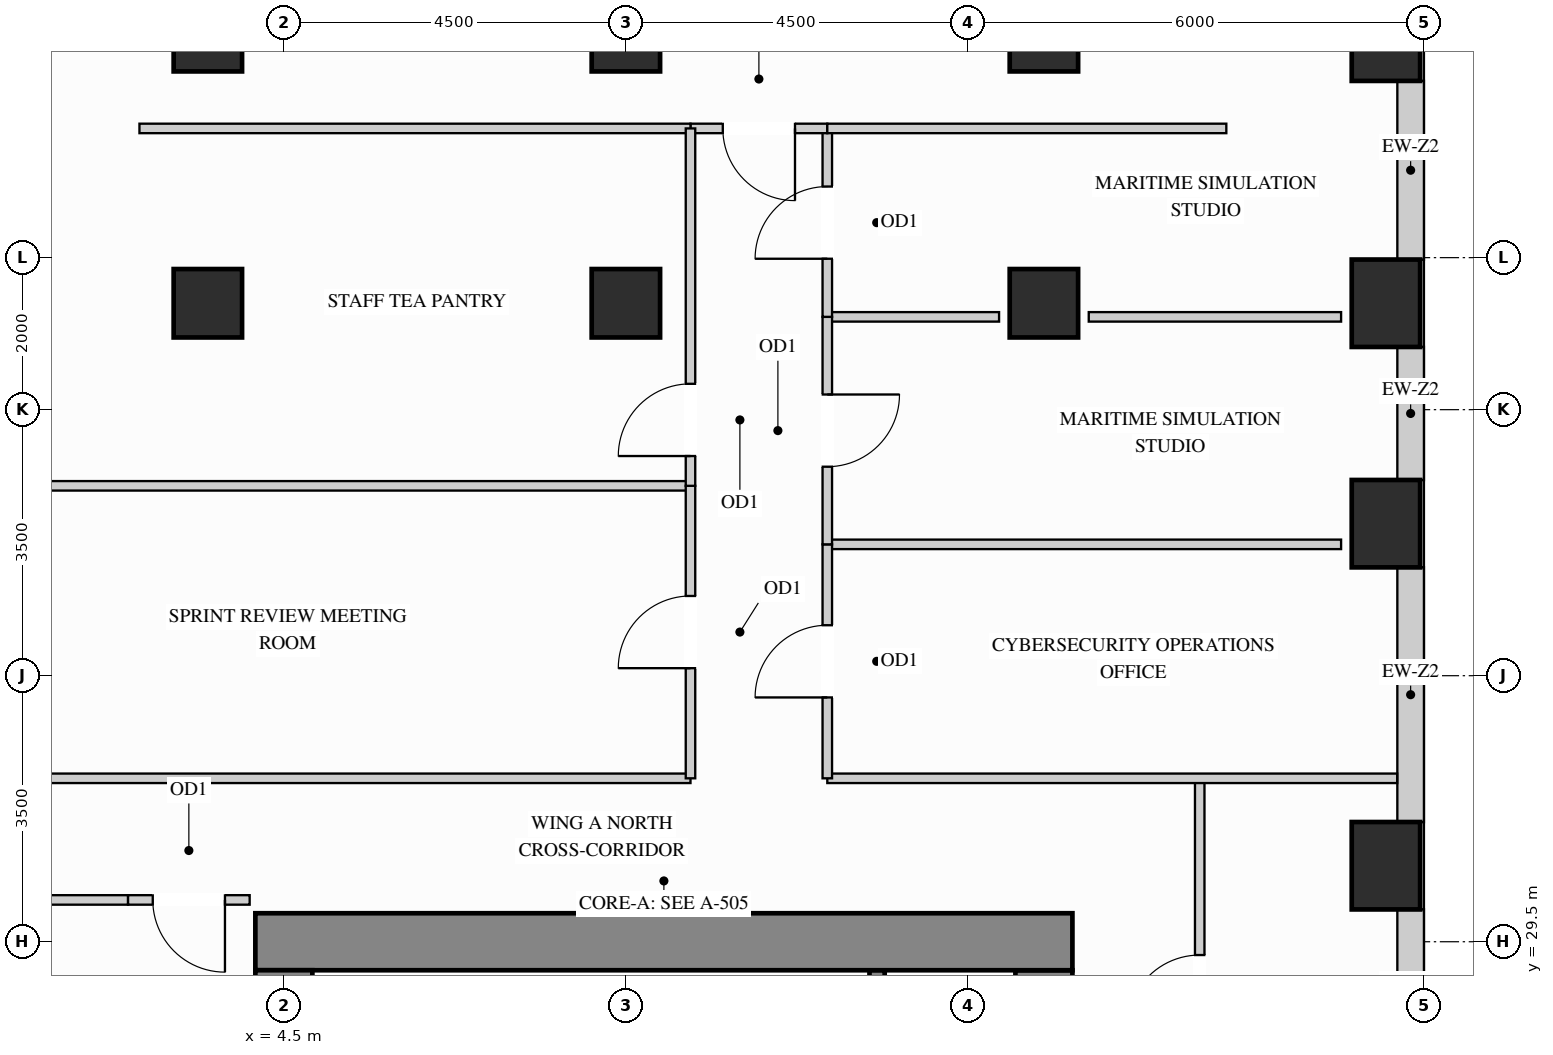
"""IFC4 building model, lengths in metres.
Left out: names, types, materials, properties, quantities, classifications, styles, units other than length and angle.
Written with IfcOpenShell. Run it as: python <this file> out.ifc"""

import sys

from ifc_helpers import new_model, si_unit, direction, frame, frame_2d, origin, origin_2d, place, context, subcontext, project, spatial, rectangle, extrude, source, transform, mapped, element, fill, save


model = new_model("IFC4")
c1 = context("Model", 3, precision=1e-05, world=origin(), true_north=direction((0.0, 1.0)))
c2 = subcontext(c1, "Body", "Model", "MODEL_VIEW")
j1 = project(units=[si_unit("LENGTHUNIT", "METRE"), si_unit("PLANEANGLEUNIT", "RADIAN")], contexts=[c1])
p1 = place(None, origin())
s1 = spatial("IfcSite", under=j1, at=p1, CompositionType="ELEMENT")
p2 = place(p1, origin())
s2 = spatial("IfcBuilding", under=s1, at=p2, CompositionType="ELEMENT")
p3 = place(p2, frame((0.0, 0.0, 102.6)))
s3 = spatial("IfcBuildingStorey", under=s2, at=p3, CompositionType="ELEMENT", Elevation=102.6)
m1 = source(origin(), c2, "Body", "SweptSolid", [
    extrude(rectangle(XDim=0.9, YDim=0.9, at=origin_2d()), origin(), (0.0, 0.0, 1.0), 3.38),
])
for number, where, z_axis, x_axis in (
    (1, (14.5, 37.9, 0.0), (0.0, 0.0, 1.0), (1.0, 0.0, 0.0)),
    (2, (14.5, 41.4, 0.0), (0.0, 0.0, 1.0), (1.0, 0.0, 0.0)),
    (3, (3.5, 37.9, 0.0), (0.0, 0.0, 1.0), (1.0, 0.0, 0.0)),
    (4, (3.5, 41.4, 0.0), (0.0, 0.0, 1.0), (1.0, 0.0, 0.0)),
    (5, (9.0, 37.9, 0.0), (0.0, 0.0, 1.0), (1.0, 0.0, 0.0)),
    (6, (9.0, 41.4, 0.0), (0.0, 0.0, 1.0), (1.0, 0.0, 0.0)),
):
    element("IfcColumn", number, at=place(p3, frame(where, z_axis=z_axis, x_axis=x_axis)), inside=s3, PredefinedType="COLUMN", context=c2, shape_type="MappedRepresentation", body=[
        mapped(m1, transform((0.0, 0.0, 0.0), x_axis=(1.0, 0.0, 0.0), y_axis=(0.0, 1.0, 0.0), z_axis=(0.0, 0.0, 1.0))),
    ])
m2 = source(origin(), c2, "Body", "SweptSolid", [
    extrude(rectangle(XDim=0.9, YDim=1.15, at=origin_2d()), origin(), (0.0, 0.0, 1.0), 3.38),
])
for number, where, z_axis, x_axis in (
    (7, (19.0, 30.5, 0.0), (0.0, 0.0, 1.0), (1.0, 0.0, 0.0)),
    (8, (19.0, 35.0, 0.0), (0.0, 0.0, 1.0), (1.0, 0.0, 0.0)),
    (9, (19.0, 37.9, 0.0), (0.0, 0.0, 1.0), (1.0, 0.0, 0.0)),
    (10, (19.0, 41.4, 0.0), (0.0, 0.0, 1.0), (1.0, 0.0, 0.0)),
):
    element("IfcColumn", number, at=place(p3, frame(where, z_axis=z_axis, x_axis=x_axis)), inside=s3, PredefinedType="COLUMN", context=c2, shape_type="MappedRepresentation", body=[
        mapped(m2, transform((0.0, 0.0, 0.0), x_axis=(1.0, 0.0, 0.0), y_axis=(0.0, 1.0, 0.0), z_axis=(0.0, 0.0, 1.0))),
    ])
m3 = source(origin(), c2, "Body", "SweptSolid", [
    extrude(rectangle(XDim=8.245, YDim=0.75, at=frame_2d((4.123, 0.0))), origin(), (0.0, 0.0, 1.0), 3.38),
])
p4 = place(p3, frame((14.5, 20.88, 0.0), z_axis=(0.0, 0.0, 1.0), x_axis=(0.0, 1.0, 0.0)))
e11 = element("IfcWall", 11, at=p4, inside=s3, PredefinedType="SHEAR", context=c2, shape_type="MappedRepresentation", body=[
    mapped(m3, transform((0.0, 0.0, 0.0), x_axis=(1.0, 0.0, 0.0), y_axis=(0.0, 1.0, 0.0), z_axis=(0.0, 0.0, 1.0))),
])
m4 = source(origin(), c2, "Body", "SweptSolid", [
    extrude(rectangle(XDim=10.75, YDim=0.75, at=frame_2d((5.375, 0.0))), origin(), (0.0, 0.0, 1.0), 3.38),
])
p5 = place(p3, frame((4.125, 29.5, 0.0), z_axis=(0.0, 0.0, 1.0), x_axis=(1.0, 0.0, 0.0)))
e12 = element("IfcWall", 12, at=p5, inside=s3, PredefinedType="SHEAR", context=c2, shape_type="MappedRepresentation", body=[
    mapped(m4, transform((0.0, 0.0, 0.0), x_axis=(1.0, 0.0, 0.0), y_axis=(0.0, 1.0, 0.0), z_axis=(0.0, 0.0, 1.0))),
])
m5 = source(origin(), c2, "Body", "SweptSolid", [
    extrude(rectangle(XDim=20.25, YDim=0.75, at=frame_2d((10.125, 0.0))), origin(), (0.0, 0.0, 1.0), 3.38),
])
p6 = place(p3, frame((4.5, 8.875, 0.0), z_axis=(0.0, 0.0, 1.0), x_axis=(0.0, 1.0, 0.0)))
e13 = element("IfcWall", 13, at=p6, inside=s3, PredefinedType="SHEAR", context=c2, shape_type="MappedRepresentation", body=[
    mapped(m5, transform((0.0, 0.0, 0.0), x_axis=(1.0, 0.0, 0.0), y_axis=(0.0, 1.0, 0.0), z_axis=(0.0, 0.0, 1.0))),
])
p7 = place(p3, frame((19.325, 27.373, 0.0), z_axis=(0.0, 0.0, 1.0), x_axis=(0.0, 1.0, 0.0)))
e14 = element("IfcWall", 14, at=p7, inside=s3, PredefinedType="SOLIDWALL", context=c2, shape_type="SweptSolid", body=[
    extrude(rectangle(XDim=2.554, YDim=0.35, at=frame_2d((1.277, 0.0))), origin(), (0.0, 0.0, 1.0), 2.519),
])
p8 = place(p7, frame((0.48, 0.0, 0.78)))
e15 = element("IfcOpeningElement", 15, at=p8, cuts=e14, PredefinedType="OPENING", context=c2, shape_type="SweptSolid", body=[
    extrude(rectangle(XDim=1.2, YDim=1.559, at=frame_2d((0.6, 0.78))), frame((0.0, 0.185, 0.0), z_axis=(0.0, -1.0, 0.0), x_axis=(1.0, 0.0, 0.0)), (0.0, 0.0, 1.0), 0.37),
])
m6 = source(origin(), c2, "Body", "SweptSolid", [
    extrude(rectangle(XDim=3.354, YDim=0.35, at=frame_2d((1.677, 0.0))), origin(), (0.0, 0.0, 1.0), 2.519),
])
p9 = place(p3, frame((19.325, 31.073, 0.0), z_axis=(0.0, 0.0, 1.0), x_axis=(0.0, 1.0, 0.0)))
e16 = element("IfcWall", 16, at=p9, inside=s3, PredefinedType="SOLIDWALL", context=c2, shape_type="MappedRepresentation", body=[
    mapped(m6, transform((0.0, 0.0, 0.0), x_axis=(1.0, 0.0, 0.0), y_axis=(0.0, 1.0, 0.0), z_axis=(0.0, 0.0, 1.0))),
])
m7 = source(origin(), c2, "Body", "SweptSolid", [
    extrude(rectangle(XDim=1.754, YDim=0.35, at=frame_2d((0.877, 0.0))), origin(), (0.0, 0.0, 1.0), 2.519),
])
p10 = place(p3, frame((19.325, 35.573, 0.0), z_axis=(0.0, 0.0, 1.0), x_axis=(0.0, 1.0, 0.0)))
e17 = element("IfcWall", 17, at=p10, inside=s3, PredefinedType="SOLIDWALL", context=c2, shape_type="MappedRepresentation", body=[
    mapped(m7, transform((0.0, 0.0, 0.0), x_axis=(1.0, 0.0, 0.0), y_axis=(0.0, 1.0, 0.0), z_axis=(0.0, 0.0, 1.0))),
])
m8 = source(origin(), c2, "Body", "SweptSolid", [
    extrude(rectangle(XDim=2.354, YDim=0.35, at=frame_2d((1.177, 0.0))), origin(), (0.0, 0.0, 1.0), 2.519),
])
p11 = place(p3, frame((19.325, 38.473, 0.0), z_axis=(0.0, 0.0, 1.0), x_axis=(0.0, 1.0, 0.0)))
e18 = element("IfcWall", 18, at=p11, inside=s3, PredefinedType="SOLIDWALL", context=c2, shape_type="MappedRepresentation", body=[
    mapped(m8, transform((0.0, 0.0, 0.0), x_axis=(1.0, 0.0, 0.0), y_axis=(0.0, 1.0, 0.0), z_axis=(0.0, 0.0, 1.0))),
])
p12 = place(p3, frame((16.55, 26.05, 0.0), z_axis=(0.0, 0.0, 1.0), x_axis=(0.0, 1.0, 0.0)))
e19 = element("IfcWall", 19, at=p12, inside=s3, PredefinedType="PARTITIONING", context=c2, shape_type="SweptSolid", body=[
    extrude(rectangle(XDim=5.6, YDim=0.125, at=frame_2d((2.8, 0.0))), origin(), (0.0, 0.0, 1.0), 3.365),
])
p13 = place(p12, frame((2.325, 0.0, 0.0)))
e20 = element("IfcOpeningElement", 20, at=p13, cuts=e19, PredefinedType="OPENING", context=c2, shape_type="SweptSolid", body=[
    extrude(rectangle(XDim=0.95, YDim=2.15, at=frame_2d((0.475, 1.075))), frame((0.0, 0.073, 0.0), z_axis=(0.0, -1.0, 0.0), x_axis=(1.0, 0.0, 0.0)), (0.0, 0.0, 1.0), 0.145),
])
m9 = source(origin(), c2, "Body", "SweptSolid", [
    extrude(rectangle(XDim=6.76, YDim=0.125, at=frame_2d((3.38, 0.0))), origin(), (0.0, 0.0, 1.0), 3.365),
])
p14 = place(p3, frame((11.65, 34.728, 0.0), z_axis=(0.0, 0.0, 1.0), x_axis=(1.0, 0.0, 0.0)))
e21 = element("IfcWall", 21, at=p14, inside=s3, PredefinedType="PARTITIONING", context=c2, shape_type="MappedRepresentation", body=[
    mapped(m9, transform((0.0, 0.0, 0.0), x_axis=(1.0, 0.0, 0.0), y_axis=(0.0, 1.0, 0.0), z_axis=(0.0, 0.0, 1.0))),
])
m10 = source(origin(), c2, "Body", "SweptSolid", [
    extrude(rectangle(XDim=2.26, YDim=0.125, at=frame_2d((1.13, 0.0))), origin(), (0.0, 0.0, 1.0), 2.677),
])
p15 = place(p3, frame((11.65, 37.721, 0.0), z_axis=(0.0, 0.0, 1.0), x_axis=(1.0, 0.0, 0.0)))
e22 = element("IfcWall", 22, at=p15, inside=s3, PredefinedType="PARTITIONING", context=c2, shape_type="MappedRepresentation", body=[
    mapped(m10, transform((0.0, 0.0, 0.0), x_axis=(1.0, 0.0, 0.0), y_axis=(0.0, 1.0, 0.0), z_axis=(0.0, 0.0, 1.0))),
])
m11 = source(origin(), c2, "Body", "SweptSolid", [
    extrude(rectangle(XDim=3.32, YDim=0.125, at=frame_2d((1.66, 0.0))), origin(), (0.0, 0.0, 1.0), 2.677),
])
p16 = place(p3, frame((15.09, 37.721, 0.0), z_axis=(0.0, 0.0, 1.0), x_axis=(1.0, 0.0, 0.0)))
e23 = element("IfcWall", 23, at=p16, inside=s3, PredefinedType="PARTITIONING", context=c2, shape_type="MappedRepresentation", body=[
    mapped(m11, transform((0.0, 0.0, 0.0), x_axis=(1.0, 0.0, 0.0), y_axis=(0.0, 1.0, 0.0), z_axis=(0.0, 0.0, 1.0))),
])
m12 = source(origin(), c2, "Body", "SweptSolid", [
    extrude(rectangle(XDim=7.498, YDim=0.125, at=frame_2d((3.749, 0.0))), origin(), (0.0, 0.0, 1.0), 2.828),
])
p17 = place(p3, frame((11.65, 31.65, 0.0), z_axis=(0.0, 0.0, 1.0), x_axis=(1.0, 0.0, 0.0)))
e24 = element("IfcWall", 24, at=p17, inside=s3, PredefinedType="PARTITIONING", context=c2, shape_type="MappedRepresentation", body=[
    mapped(m12, transform((0.0, 0.0, 0.0), x_axis=(1.0, 0.0, 0.0), y_axis=(0.0, 1.0, 0.0), z_axis=(0.0, 0.0, 1.0))),
])
m13 = source(origin(), c2, "Body", "SweptSolid", [
    extrude(rectangle(XDim=9.498, YDim=0.125, at=frame_2d((4.749, 0.0))), origin(), (0.0, 0.0, 1.0), 2.828),
])
p18 = place(p3, frame((0.352, 31.65, 0.0), z_axis=(0.0, 0.0, 1.0), x_axis=(1.0, 0.0, 0.0)))
e25 = element("IfcWall", 25, at=p18, inside=s3, PredefinedType="PARTITIONING", context=c2, shape_type="MappedRepresentation", body=[
    mapped(m13, transform((0.0, 0.0, 0.0), x_axis=(1.0, 0.0, 0.0), y_axis=(0.0, 1.0, 0.0), z_axis=(0.0, 0.0, 1.0))),
])
m14 = source(origin(), c2, "Body", "SweptSolid", [
    extrude(rectangle(XDim=8.66, YDim=0.125, at=frame_2d((4.33, 0.0))), origin(), (0.0, 0.0, 1.0), 3.365),
])
p19 = place(p3, frame((1.19, 35.498, 0.0), z_axis=(0.0, 0.0, 1.0), x_axis=(1.0, 0.0, 0.0)))
e26 = element("IfcWall", 26, at=p19, inside=s3, PredefinedType="PARTITIONING", context=c2, shape_type="MappedRepresentation", body=[
    mapped(m14, transform((0.0, 0.0, 0.0), x_axis=(1.0, 0.0, 0.0), y_axis=(0.0, 1.0, 0.0), z_axis=(0.0, 0.0, 1.0))),
])
m15 = source(origin(), c2, "Body", "SweptSolid", [
    extrude(rectangle(XDim=1.26, YDim=0.125, at=frame_2d((0.63, 0.0))), origin(), (0.0, 0.0, 1.0), 3.365),
])
p20 = place(p3, frame((1.19, 30.05, 0.0), z_axis=(0.0, 0.0, 1.0), x_axis=(1.0, 0.0, 0.0)))
e27 = element("IfcWall", 27, at=p20, inside=s3, PredefinedType="PARTITIONING", context=c2, shape_type="MappedRepresentation", body=[
    mapped(m15, transform((0.0, 0.0, 0.0), x_axis=(1.0, 0.0, 0.0), y_axis=(0.0, 1.0, 0.0), z_axis=(0.0, 0.0, 1.0))),
])
p21 = place(p3, frame((2.45, 30.05, 0.0), z_axis=(0.0, 0.0, 1.0), x_axis=(1.0, 0.0, 0.0)))
e28 = element("IfcWall", 28, at=p21, inside=s3, PredefinedType="PARTITIONING", context=c2, shape_type="SweptSolid", body=[
    extrude(rectangle(XDim=1.6, YDim=0.125, at=frame_2d((0.8, 0.0))), origin(), (0.0, 0.0, 1.0), 3.365),
])
p22 = place(p21, frame((0.325, 0.0, 0.0)))
e29 = element("IfcOpeningElement", 29, at=p22, cuts=e28, PredefinedType="OPENING", context=c2, shape_type="SweptSolid", body=[
    extrude(rectangle(XDim=0.95, YDim=2.15, at=frame_2d((0.475, 1.075))), frame((0.0, 0.073, 0.0), z_axis=(0.0, -1.0, 0.0), x_axis=(1.0, 0.0, 0.0)), (0.0, 0.0, 1.0), 0.145),
])
p23 = place(p3, frame((11.65, 31.65, 0.0), z_axis=(0.0, 0.0, 1.0), x_axis=(0.0, 1.0, 0.0)))
e30 = element("IfcWall", 30, at=p23, inside=s3, PredefinedType="PARTITIONING", context=c2, shape_type="SweptSolid", body=[
    extrude(rectangle(XDim=3.078, YDim=0.125, at=frame_2d((1.539, 0.0))), origin(), (0.0, 0.0, 1.0), 3.365),
])
p24 = place(p23, frame((1.064, 0.0, 0.0)))
e31 = element("IfcOpeningElement", 31, at=p24, cuts=e30, PredefinedType="OPENING", context=c2, shape_type="SweptSolid", body=[
    extrude(rectangle(XDim=0.95, YDim=2.15, at=frame_2d((0.475, 1.075))), frame((0.0, 0.073, 0.0), z_axis=(0.0, -1.0, 0.0), x_axis=(1.0, 0.0, 0.0)), (0.0, 0.0, 1.0), 0.145),
])
p25 = place(p3, frame((11.65, 34.728, 0.0), z_axis=(0.0, 0.0, 1.0), x_axis=(0.0, 1.0, 0.0)))
e32 = element("IfcWall", 32, at=p25, inside=s3, PredefinedType="PARTITIONING", context=c2, shape_type="SweptSolid", body=[
    extrude(rectangle(XDim=2.993, YDim=0.125, at=frame_2d((1.497, 0.0))), origin(), (0.0, 0.0, 1.0), 3.365),
])
p26 = place(p25, frame((1.021, 0.0, 0.0)))
e33 = element("IfcOpeningElement", 33, at=p26, cuts=e32, PredefinedType="OPENING", context=c2, shape_type="SweptSolid", body=[
    extrude(rectangle(XDim=0.95, YDim=2.15, at=frame_2d((0.475, 1.075))), frame((0.0, 0.073, 0.0), z_axis=(0.0, -1.0, 0.0), x_axis=(1.0, 0.0, 0.0)), (0.0, 0.0, 1.0), 0.145),
])
p27 = place(p3, frame((11.65, 37.721, 0.0), z_axis=(0.0, 0.0, 1.0), x_axis=(0.0, 1.0, 0.0)))
e34 = element("IfcWall", 34, at=p27, inside=s3, PredefinedType="PARTITIONING", context=c2, shape_type="SweptSolid", body=[
    extrude(rectangle(XDim=2.479, YDim=0.125, at=frame_2d((1.24, 0.0))), origin(), (0.0, 0.0, 1.0), 3.365),
])
p28 = place(p27, frame((0.764, 0.0, 0.0)))
e35 = element("IfcOpeningElement", 35, at=p28, cuts=e34, PredefinedType="OPENING", context=c2, shape_type="SweptSolid", body=[
    extrude(rectangle(XDim=0.95, YDim=2.15, at=frame_2d((0.475, 1.075))), frame((0.0, 0.073, 0.0), z_axis=(0.0, -1.0, 0.0), x_axis=(1.0, 0.0, 0.0)), (0.0, 0.0, 1.0), 0.145),
])
p29 = place(p3, frame((9.85, 40.2, 0.0), z_axis=(0.0, 0.0, 1.0), x_axis=(1.0, 0.0, 0.0)))
e36 = element("IfcWall", 36, at=p29, inside=s3, PredefinedType="PARTITIONING", context=c2, shape_type="SweptSolid", body=[
    extrude(rectangle(XDim=1.8, YDim=0.125, at=frame_2d((0.9, 0.0))), origin(), (0.0, 0.0, 1.0), 3.365),
])
p30 = place(p29, frame((0.425, 0.0, 0.0)))
e37 = element("IfcOpeningElement", 37, at=p30, cuts=e36, PredefinedType="OPENING", context=c2, shape_type="SweptSolid", body=[
    extrude(rectangle(XDim=0.95, YDim=2.15, at=frame_2d((0.475, 1.075))), frame((0.0, 0.073, 0.0), z_axis=(0.0, -1.0, 0.0), x_axis=(1.0, 0.0, 0.0)), (0.0, 0.0, 1.0), 0.145),
])
m16 = source(origin(), c2, "Body", "SweptSolid", [
    extrude(rectangle(XDim=5.25, YDim=0.125, at=frame_2d((2.625, 0.0))), origin(), (0.0, 0.0, 1.0), 3.365),
])
p31 = place(p3, frame((11.65, 40.2, 0.0), z_axis=(0.0, 0.0, 1.0), x_axis=(1.0, 0.0, 0.0)))
e38 = element("IfcWall", 38, at=p31, inside=s3, PredefinedType="PARTITIONING", context=c2, shape_type="MappedRepresentation", body=[
    mapped(m16, transform((0.0, 0.0, 0.0), x_axis=(1.0, 0.0, 0.0), y_axis=(0.0, 1.0, 0.0), z_axis=(0.0, 0.0, 1.0))),
])
m17 = source(origin(), c2, "Body", "SweptSolid", [
    extrude(rectangle(XDim=7.25, YDim=0.125, at=frame_2d((3.625, 0.0))), origin(), (0.0, 0.0, 1.0), 3.365),
])
p32 = place(p3, frame((2.6, 40.2, 0.0), z_axis=(0.0, 0.0, 1.0), x_axis=(1.0, 0.0, 0.0)))
e39 = element("IfcWall", 39, at=p32, inside=s3, PredefinedType="PARTITIONING", context=c2, shape_type="MappedRepresentation", body=[
    mapped(m17, transform((0.0, 0.0, 0.0), x_axis=(1.0, 0.0, 0.0), y_axis=(0.0, 1.0, 0.0), z_axis=(0.0, 0.0, 1.0))),
])
p33 = place(p3, frame((9.85, 31.65, 0.0), z_axis=(0.0, 0.0, 1.0), x_axis=(0.0, 1.0, 0.0)))
e40 = element("IfcWall", 40, at=p33, inside=s3, PredefinedType="PARTITIONING", context=c2, shape_type="SweptSolid", body=[
    extrude(rectangle(XDim=3.848, YDim=0.125, at=frame_2d((1.924, 0.0))), origin(), (0.0, 0.0, 1.0), 3.365),
])
p34 = place(p33, frame((1.449, 0.0, 0.0)))
e41 = element("IfcOpeningElement", 41, at=p34, cuts=e40, PredefinedType="OPENING", context=c2, shape_type="SweptSolid", body=[
    extrude(rectangle(XDim=0.95, YDim=2.15, at=frame_2d((0.475, 1.075))), frame((0.0, 0.073, 0.0), z_axis=(0.0, -1.0, 0.0), x_axis=(1.0, 0.0, 0.0)), (0.0, 0.0, 1.0), 0.145),
])
p35 = place(p3, frame((9.85, 35.498, 0.0), z_axis=(0.0, 0.0, 1.0), x_axis=(0.0, 1.0, 0.0)))
e42 = element("IfcWall", 42, at=p35, inside=s3, PredefinedType="PARTITIONING", context=c2, shape_type="SweptSolid", body=[
    extrude(rectangle(XDim=4.702, YDim=0.125, at=frame_2d((2.351, 0.0))), origin(), (0.0, 0.0, 1.0), 3.365),
])
p36 = place(p35, frame((0.392, 0.0, 0.0)))
e43 = element("IfcOpeningElement", 43, at=p36, cuts=e42, PredefinedType="OPENING", context=c2, shape_type="SweptSolid", body=[
    extrude(rectangle(XDim=0.95, YDim=2.15, at=frame_2d((0.475, 1.075))), frame((0.0, 0.073, 0.0), z_axis=(0.0, -1.0, 0.0), x_axis=(1.0, 0.0, 0.0)), (0.0, 0.0, 1.0), 0.145),
])
m18 = source(origin(), c2, "Body", "SweptSolid", [
    extrude(rectangle(XDim=3.678, YDim=0.2, at=frame_2d((1.839, 0.0))), origin(), (0.0, 0.0, 1.0), 3.38),
])
p37 = place(p3, frame((12.305, 25.445, 0.0), z_axis=(0.0, 0.0, 1.0), x_axis=(0.0, 1.0, 0.0)))
e44 = element("IfcWall", 44, at=p37, inside=s3, PredefinedType="SHEAR", context=c2, shape_type="MappedRepresentation", body=[
    mapped(m18, transform((0.0, 0.0, 0.0), x_axis=(1.0, 0.0, 0.0), y_axis=(0.0, 1.0, 0.0), z_axis=(0.0, 0.0, 1.0))),
])
m19 = source(origin(), c2, "Body", "SweptSolid", [
    extrude(rectangle(XDim=0.95, YDim=2.15, at=frame_2d((0.475, 1.075))), frame((0.0, 0.025, 0.0), z_axis=(0.0, -1.0, 0.0), x_axis=(1.0, 0.0, 0.0)), (0.0, 0.0, 1.0), 0.05),
])
p38 = place(p13, origin())
e45 = element("IfcDoor", 45, at=p38, inside=s3, OperationType="SINGLE_SWING_LEFT", PredefinedType="DOOR", context=c2, shape_type="MappedRepresentation", body=[
    mapped(m19, transform((0.0, 0.0, 0.0), x_axis=(1.0, 0.0, 0.0), y_axis=(0.0, 1.0, 0.0), z_axis=(0.0, 0.0, 1.0))),
])
fill(e20, e45)
p39 = place(p24, origin())
e46 = element("IfcDoor", 46, at=p39, inside=s3, OperationType="SINGLE_SWING_LEFT", PredefinedType="DOOR", context=c2, shape_type="MappedRepresentation", body=[
    mapped(m19, transform((0.0, 0.0, 0.0), x_axis=(1.0, 0.0, 0.0), y_axis=(0.0, 1.0, 0.0), z_axis=(0.0, 0.0, 1.0))),
])
fill(e31, e46)
p40 = place(p26, origin())
e47 = element("IfcDoor", 47, at=p40, inside=s3, OperationType="SINGLE_SWING_RIGHT", PredefinedType="DOOR", context=c2, shape_type="MappedRepresentation", body=[
    mapped(m19, transform((0.0, 0.0, 0.0), x_axis=(1.0, 0.0, 0.0), y_axis=(0.0, 1.0, 0.0), z_axis=(0.0, 0.0, 1.0))),
])
fill(e33, e47)
p41 = place(p28, origin())
e48 = element("IfcDoor", 48, at=p41, inside=s3, OperationType="SINGLE_SWING_LEFT", PredefinedType="DOOR", context=c2, shape_type="MappedRepresentation", body=[
    mapped(m19, transform((0.0, 0.0, 0.0), x_axis=(1.0, 0.0, 0.0), y_axis=(0.0, 1.0, 0.0), z_axis=(0.0, 0.0, 1.0))),
])
fill(e35, e48)
p42 = place(p30, origin())
e49 = element("IfcDoor", 49, at=p42, inside=s3, OperationType="SINGLE_SWING_RIGHT", PredefinedType="DOOR", context=c2, shape_type="MappedRepresentation", body=[
    mapped(m19, transform((0.0, 0.0, 0.0), x_axis=(1.0, 0.0, 0.0), y_axis=(0.0, 1.0, 0.0), z_axis=(0.0, 0.0, 1.0))),
])
fill(e37, e49)
p43 = place(p34, origin())
e50 = element("IfcDoor", 50, at=p43, inside=s3, OperationType="SINGLE_SWING_LEFT", PredefinedType="DOOR", context=c2, shape_type="MappedRepresentation", body=[
    mapped(m19, transform((0.0, 0.0, 0.0), x_axis=(1.0, 0.0, 0.0), y_axis=(0.0, 1.0, 0.0), z_axis=(0.0, 0.0, 1.0))),
])
fill(e41, e50)
p44 = place(p36, origin())
e51 = element("IfcDoor", 51, at=p44, inside=s3, OperationType="SINGLE_SWING_LEFT", PredefinedType="DOOR", context=c2, shape_type="MappedRepresentation", body=[
    mapped(m19, transform((0.0, 0.0, 0.0), x_axis=(1.0, 0.0, 0.0), y_axis=(0.0, 1.0, 0.0), z_axis=(0.0, 0.0, 1.0))),
])
fill(e43, e51)
p45 = place(p22, origin())
e52 = element("IfcDoor", 52, at=p45, inside=s3, OperationType="SINGLE_SWING_RIGHT", PredefinedType="DOOR", context=c2, shape_type="MappedRepresentation", body=[
    mapped(m19, transform((0.0, 0.0, 0.0), x_axis=(1.0, 0.0, 0.0), y_axis=(0.0, 1.0, 0.0), z_axis=(0.0, 0.0, 1.0))),
])
fill(e29, e52)
m20 = source(origin(), c2, "Body", "SweptSolid", [
    extrude(rectangle(XDim=1.2, YDim=1.559, at=frame_2d((0.6, 0.78))), frame((0.0, 0.03, 0.0), z_axis=(0.0, -1.0, 0.0), x_axis=(1.0, 0.0, 0.0)), (0.0, 0.0, 1.0), 0.06),
])
p46 = place(p8, origin())
e53 = element("IfcWindow", 53, at=p46, inside=s3, PartitioningType="SINGLE_PANEL", PredefinedType="WINDOW", context=c2, shape_type="MappedRepresentation", body=[
    mapped(m20, transform((0.0, 0.0, 0.0), x_axis=(1.0, 0.0, 0.0), y_axis=(0.0, 1.0, 0.0), z_axis=(0.0, 0.0, 1.0))),
])
fill(e15, e53)
save(model, sys.argv[1])
